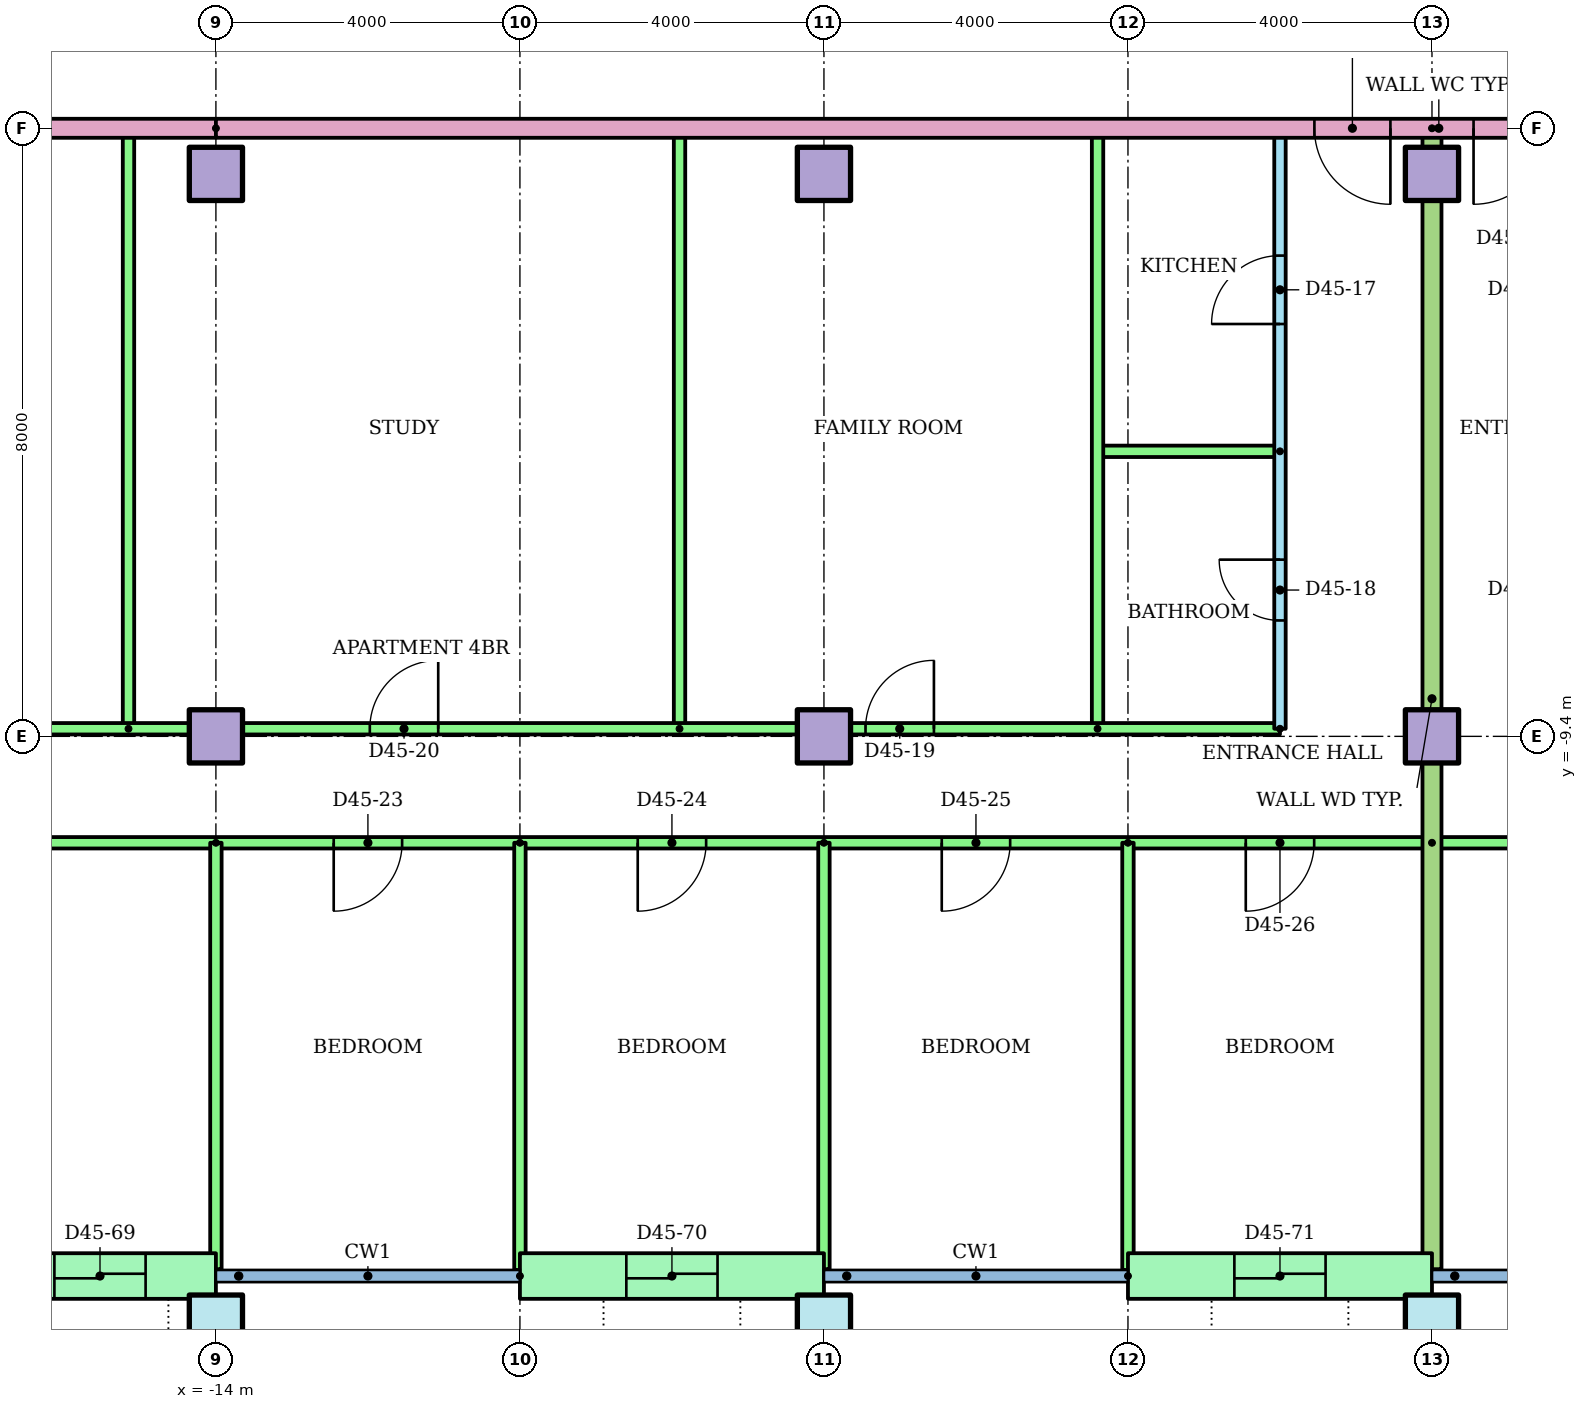
"""IFC4 building model, lengths in metres.
Left out: names, types, materials, properties, quantities, classifications, styles, units other than length and angle.
Written with IfcOpenShell. Run it as: python <this file> out.ifc"""

import sys

from ifc_helpers import new_model, si_unit, direction, frame, frame_2d, origin, origin_2d, place, context, subcontext, project, spatial, rectangle, hollow_rectangle, extrude, element, fill, save


model = new_model("IFC4")
c1 = context("Model", 3, precision=1e-05, world=origin(), true_north=direction((0.0, 1.0)))
c2 = subcontext(c1, "Body", "Model", "MODEL_VIEW")
j1 = project(units=[si_unit("LENGTHUNIT", "METRE"), si_unit("PLANEANGLEUNIT", "RADIAN")], contexts=[c1])
p1 = place(None, origin())
s1 = spatial("IfcSite", under=j1, at=p1, CompositionType="ELEMENT")
p2 = place(p1, origin())
s2 = spatial("IfcBuilding", under=s1, at=p2, CompositionType="ELEMENT")
p3 = place(p2, frame((0.0, 0.0, 174.9)))
s3 = spatial("IfcBuildingStorey", under=s2, at=p3, CompositionType="ELEMENT", Elevation=174.9)
for number, where in (
    (1, (-14.0, -17.1, 0.0)),
    (2, (-6.0, -17.1, 0.0)),
    (3, (2.0, -17.1, 0.0)),
):
    element("IfcColumn", number, at=place(p3, frame(where)), inside=s3, PredefinedType="COLUMN", context=c2, shape_type="SweptSolid", body=[
        extrude(hollow_rectangle(XDim=0.7, YDim=0.7, WallThickness=0.036, at=origin_2d()), origin(), (0.0, 0.0, 1.0), 3.2),
    ])
for number, where in (
    (4, (-14.0, -9.4, 0.0)),
    (5, (-6.0, -9.4, 0.0)),
    (6, (2.0, -9.4, 0.0)),
    (7, (-14.0, -2.0, 0.0)),
    (8, (-6.0, -2.0, 0.0)),
    (9, (2.0, -2.0, 0.0)),
):
    element("IfcColumn", number, at=place(p3, frame(where)), inside=s3, PredefinedType="COLUMN", context=c2, shape_type="SweptSolid", body=[
        extrude(rectangle(XDim=0.7, YDim=0.7, at=origin_2d()), origin(), (0.0, 0.0, 1.0), 3.2),
    ])
p4 = place(p3, frame((-17.05, -16.5, 0.0)))
e10 = element("IfcWall", 10, at=p4, inside=s3, PredefinedType="STANDARD", context=c2, shape_type="SweptSolid", body=[
    extrude(rectangle(XDim=3.05, YDim=0.6, at=frame_2d((1.525, 0.0))), origin(), (0.0, 0.0, 1.0), 2.92),
])
p5 = place(p4, frame((0.925, 0.0, 0.0)))
e11 = element("IfcOpeningElement", 11, at=p5, cuts=e10, PredefinedType="OPENING", context=c2, shape_type="SweptSolid", body=[
    extrude(rectangle(XDim=1.2, YDim=2.1, at=frame_2d((0.6, 1.05))), frame((0.0, 0.31, 0.0), z_axis=(0.0, -1.0, 0.0), x_axis=(1.0, 0.0, 0.0)), (0.0, 0.0, 1.0), 0.62),
])
p6 = place(p3, frame((-10.0, -16.5, 0.0)))
e12 = element("IfcWall", 12, at=p6, inside=s3, PredefinedType="STANDARD", context=c2, shape_type="SweptSolid", body=[
    extrude(rectangle(XDim=4.0, YDim=0.6, at=frame_2d((2.0, 0.0))), origin(), (0.0, 0.0, 1.0), 2.92),
])
p7 = place(p6, frame((1.4, 0.0, 0.0)))
e13 = element("IfcOpeningElement", 13, at=p7, cuts=e12, PredefinedType="OPENING", context=c2, shape_type="SweptSolid", body=[
    extrude(rectangle(XDim=1.2, YDim=2.1, at=frame_2d((0.6, 1.05))), frame((0.0, 0.31, 0.0), z_axis=(0.0, -1.0, 0.0), x_axis=(1.0, 0.0, 0.0)), (0.0, 0.0, 1.0), 0.62),
])
p8 = place(p3, frame((-2.0, -16.5, 0.0)))
e14 = element("IfcWall", 14, at=p8, inside=s3, PredefinedType="STANDARD", context=c2, shape_type="SweptSolid", body=[
    extrude(rectangle(XDim=4.0, YDim=0.6, at=frame_2d((2.0, 0.0))), origin(), (0.0, 0.0, 1.0), 2.92),
])
p9 = place(p8, frame((1.4, 0.0, 0.0)))
e15 = element("IfcOpeningElement", 15, at=p9, cuts=e14, PredefinedType="OPENING", context=c2, shape_type="SweptSolid", body=[
    extrude(rectangle(XDim=1.2, YDim=2.1, at=frame_2d((0.6, 1.05))), frame((0.0, 0.31, 0.0), z_axis=(0.0, -1.0, 0.0), x_axis=(1.0, 0.0, 0.0)), (0.0, 0.0, 1.0), 0.62),
])
p10 = place(p3, frame((0.0, -9.3, 0.0), z_axis=(0.0, 0.0, 1.0), x_axis=(0.0, 1.0, 0.0)))
e16 = element("IfcWall", 16, at=p10, inside=s3, PredefinedType="PARTITIONING", context=c2, shape_type="SweptSolid", body=[
    extrude(rectangle(XDim=7.9, YDim=0.15, at=frame_2d((3.95, 0.0))), origin(), (0.0, 0.0, 1.0), 2.4),
])
p11 = place(p10, frame((5.325, 0.0, 0.0)))
e17 = element("IfcOpeningElement", 17, at=p11, cuts=e16, PredefinedType="OPENING", context=c2, shape_type="SweptSolid", body=[
    extrude(rectangle(XDim=0.9, YDim=2.1, at=frame_2d((0.45, 1.05))), frame((0.0, 0.085, 0.0), z_axis=(0.0, -1.0, 0.0), x_axis=(1.0, 0.0, 0.0)), (0.0, 0.0, 1.0), 0.17),
])
p12 = place(p10, frame((1.425, 0.0, 0.0)))
e18 = element("IfcOpeningElement", 18, at=p12, cuts=e16, PredefinedType="OPENING", context=c2, shape_type="SweptSolid", body=[
    extrude(rectangle(XDim=0.8, YDim=2.1, at=frame_2d((0.4, 1.05))), frame((0.0, 0.085, 0.0), z_axis=(0.0, -1.0, 0.0), x_axis=(1.0, 0.0, 0.0)), (0.0, 0.0, 1.0), 0.17),
])
p13 = place(p3, frame((0.0, -5.65, 0.0), z_axis=(0.0, 0.0, 1.0), x_axis=(-1.0, 0.0, 0.0)))
e19 = element("IfcWall", 19, at=p13, inside=s3, PredefinedType="PARTITIONING", context=c2, shape_type="SweptSolid", body=[
    extrude(rectangle(XDim=2.4, YDim=0.15, at=frame_2d((1.2, 0.0))), origin(), (0.0, 0.0, 1.0), 2.4),
])
for number, where, z_axis, x_axis in (
    (20, (-2.4, -9.3, 0.0), (0.0, 0.0, 1.0), (0.0, 1.0, 0.0)),
    (21, (-7.9, -9.3, 0.0), (0.0, 0.0, 1.0), (0.0, 1.0, 0.0)),
    (22, (-15.15, -9.3, 0.0), (0.0, 0.0, 1.0), (0.0, 1.0, 0.0)),
):
    element("IfcWall", number, at=place(p3, frame(where, z_axis=z_axis, x_axis=x_axis)), inside=s3, PredefinedType="PARTITIONING", context=c2, shape_type="SweptSolid", body=[
        extrude(rectangle(XDim=7.9, YDim=0.15, at=frame_2d((3.95, 0.0))), origin(), (0.0, 0.0, 1.0), 2.4),
    ])
p14 = place(p3, frame((-24.81, -9.3, 0.0)))
e23 = element("IfcWall", 23, at=p14, inside=s3, PredefinedType="PARTITIONING", context=c2, shape_type="SweptSolid", body=[
    extrude(rectangle(XDim=24.81, YDim=0.15, at=frame_2d((12.405, 0.0))), origin(), (0.0, 0.0, 1.0), 2.4),
])
p15 = place(p14, frame((19.357, 0.0, 0.0)))
e24 = element("IfcOpeningElement", 24, at=p15, cuts=e23, PredefinedType="OPENING", context=c2, shape_type="SweptSolid", body=[
    extrude(rectangle(XDim=0.9, YDim=2.1, at=frame_2d((0.45, 1.05))), frame((0.0, 0.085, 0.0), z_axis=(0.0, -1.0, 0.0), x_axis=(1.0, 0.0, 0.0)), (0.0, 0.0, 1.0), 0.17),
])
p16 = place(p14, frame((12.835, 0.0, 0.0)))
e25 = element("IfcOpeningElement", 25, at=p16, cuts=e23, PredefinedType="OPENING", context=c2, shape_type="SweptSolid", body=[
    extrude(rectangle(XDim=0.9, YDim=2.1, at=frame_2d((0.45, 1.05))), frame((0.0, 0.085, 0.0), z_axis=(0.0, -1.0, 0.0), x_axis=(1.0, 0.0, 0.0)), (0.0, 0.0, 1.0), 0.17),
])
p17 = place(p14, frame((4.485, 0.0, 0.0)))
e26 = element("IfcOpeningElement", 26, at=p17, cuts=e23, PredefinedType="OPENING", context=c2, shape_type="SweptSolid", body=[
    extrude(rectangle(XDim=0.9, YDim=2.1, at=frame_2d((0.45, 1.05))), frame((0.0, 0.085, 0.0), z_axis=(0.0, -1.0, 0.0), x_axis=(1.0, 0.0, 0.0)), (0.0, 0.0, 1.0), 0.17),
])
p18 = place(p3, frame((2.0, -10.8, 0.0), z_axis=(0.0, 0.0, 1.0), x_axis=(-1.0, 0.0, 0.0)))
e27 = element("IfcWall", 27, at=p18, inside=s3, PredefinedType="PARTITIONING", context=c2, shape_type="SweptSolid", body=[
    extrude(rectangle(XDim=26.82, YDim=0.15, at=frame_2d((13.41, 0.0))), origin(), (0.0, 0.0, 1.0), 2.4),
])
p19 = place(p18, frame((20.8, 0.0, 0.0)))
e28 = element("IfcOpeningElement", 28, at=p19, cuts=e27, PredefinedType="OPENING", context=c2, shape_type="SweptSolid", body=[
    extrude(rectangle(XDim=1.0, YDim=2.1, at=frame_2d((0.5, 1.05))), frame((0.0, 0.085, 0.0), z_axis=(0.0, -1.0, 0.0), x_axis=(1.0, 0.0, 0.0)), (0.0, 0.0, 1.0), 0.17),
])
p20 = place(p18, frame((13.55, 0.0, 0.0)))
e29 = element("IfcOpeningElement", 29, at=p20, cuts=e27, PredefinedType="OPENING", context=c2, shape_type="SweptSolid", body=[
    extrude(rectangle(XDim=0.9, YDim=2.1, at=frame_2d((0.45, 1.05))), frame((0.0, 0.085, 0.0), z_axis=(0.0, -1.0, 0.0), x_axis=(1.0, 0.0, 0.0)), (0.0, 0.0, 1.0), 0.17),
])
p21 = place(p18, frame((9.55, 0.0, 0.0)))
e30 = element("IfcOpeningElement", 30, at=p21, cuts=e27, PredefinedType="OPENING", context=c2, shape_type="SweptSolid", body=[
    extrude(rectangle(XDim=0.9, YDim=2.1, at=frame_2d((0.45, 1.05))), frame((0.0, 0.085, 0.0), z_axis=(0.0, -1.0, 0.0), x_axis=(1.0, 0.0, 0.0)), (0.0, 0.0, 1.0), 0.17),
])
p22 = place(p18, frame((5.55, 0.0, 0.0)))
e31 = element("IfcOpeningElement", 31, at=p22, cuts=e27, PredefinedType="OPENING", context=c2, shape_type="SweptSolid", body=[
    extrude(rectangle(XDim=0.9, YDim=2.1, at=frame_2d((0.45, 1.05))), frame((0.0, 0.085, 0.0), z_axis=(0.0, -1.0, 0.0), x_axis=(1.0, 0.0, 0.0)), (0.0, 0.0, 1.0), 0.17),
])
p23 = place(p18, frame((1.55, 0.0, 0.0)))
e32 = element("IfcOpeningElement", 32, at=p23, cuts=e27, PredefinedType="OPENING", context=c2, shape_type="SweptSolid", body=[
    extrude(rectangle(XDim=0.9, YDim=2.1, at=frame_2d((0.45, 1.05))), frame((0.0, 0.085, 0.0), z_axis=(0.0, -1.0, 0.0), x_axis=(1.0, 0.0, 0.0)), (0.0, 0.0, 1.0), 0.17),
])
p24 = place(p3, frame((-14.0, -10.8, 0.0), z_axis=(0.0, 0.0, 1.0), x_axis=(0.0, -1.0, 0.0)))
e33 = element("IfcWall", 33, at=p24, inside=s3, PredefinedType="PARTITIONING", context=c2, shape_type="SweptSolid", body=[
    extrude(rectangle(XDim=5.61, YDim=0.15, at=frame_2d((2.805, 0.0))), origin(), (0.0, 0.0, 1.0), 2.4),
])
p25 = place(p3, frame((-10.0, -10.8, 0.0), z_axis=(0.0, 0.0, 1.0), x_axis=(0.0, -1.0, 0.0)))
e34 = element("IfcWall", 34, at=p25, inside=s3, PredefinedType="PARTITIONING", context=c2, shape_type="SweptSolid", body=[
    extrude(rectangle(XDim=5.621, YDim=0.15, at=frame_2d((2.811, 0.0))), origin(), (0.0, 0.0, 1.0), 2.4),
])
p26 = place(p3, frame((-6.0, -10.8, 0.0), z_axis=(0.0, 0.0, 1.0), x_axis=(0.0, -1.0, 0.0)))
e35 = element("IfcWall", 35, at=p26, inside=s3, PredefinedType="PARTITIONING", context=c2, shape_type="SweptSolid", body=[
    extrude(rectangle(XDim=5.61, YDim=0.15, at=frame_2d((2.805, 0.0))), origin(), (0.0, 0.0, 1.0), 2.4),
])
p27 = place(p3, frame((-2.0, -10.8, 0.0), z_axis=(0.0, 0.0, 1.0), x_axis=(0.0, -1.0, 0.0)))
e36 = element("IfcWall", 36, at=p27, inside=s3, PredefinedType="PARTITIONING", context=c2, shape_type="SweptSolid", body=[
    extrude(rectangle(XDim=5.621, YDim=0.15, at=frame_2d((2.811, 0.0))), origin(), (0.0, 0.0, 1.0), 2.4),
])
p28 = place(p3, frame((18.0, -10.8, 0.0), z_axis=(0.0, 0.0, 1.0), x_axis=(-1.0, 0.0, 0.0)))
e37 = element("IfcWall", 37, at=p28, inside=s3, PredefinedType="PARTITIONING", context=c2, shape_type="SweptSolid", body=[
    extrude(rectangle(XDim=16.0, YDim=0.15, at=frame_2d((8.0, 0.0))), origin(), (0.0, 0.0, 1.0), 2.4),
])
p29 = place(p28, frame((11.5, 0.0, 0.0)))
e38 = element("IfcOpeningElement", 38, at=p29, cuts=e37, PredefinedType="OPENING", context=c2, shape_type="SweptSolid", body=[
    extrude(rectangle(XDim=1.0, YDim=2.1, at=frame_2d((0.5, 1.05))), frame((0.0, 0.085, 0.0), z_axis=(0.0, -1.0, 0.0), x_axis=(1.0, 0.0, 0.0)), (0.0, 0.0, 1.0), 0.17),
])
p30 = place(p28, frame((5.55, 0.0, 0.0)))
e39 = element("IfcOpeningElement", 39, at=p30, cuts=e37, PredefinedType="OPENING", context=c2, shape_type="SweptSolid", body=[
    extrude(rectangle(XDim=0.9, YDim=2.1, at=frame_2d((0.45, 1.05))), frame((0.0, 0.085, 0.0), z_axis=(0.0, -1.0, 0.0), x_axis=(1.0, 0.0, 0.0)), (0.0, 0.0, 1.0), 0.17),
])
p31 = place(p28, frame((1.55, 0.0, 0.0)))
e40 = element("IfcOpeningElement", 40, at=p31, cuts=e37, PredefinedType="OPENING", context=c2, shape_type="SweptSolid", body=[
    extrude(rectangle(XDim=0.9, YDim=2.1, at=frame_2d((0.45, 1.05))), frame((0.0, 0.085, 0.0), z_axis=(0.0, -1.0, 0.0), x_axis=(1.0, 0.0, 0.0)), (0.0, 0.0, 1.0), 0.17),
])
p32 = place(p3, frame((2.0, -1.4, 0.0), z_axis=(0.0, 0.0, 1.0), x_axis=(0.0, -1.0, 0.0)))
e41 = element("IfcWall", 41, at=p32, inside=s3, PredefinedType="PARTITIONING", context=c2, shape_type="SweptSolid", body=[
    extrude(rectangle(XDim=15.01, YDim=0.25, at=frame_2d((7.505, 0.0))), origin(), (0.0, 0.0, 1.0), 2.4),
])
p33 = place(p3, frame((-14.0, -1.4, 0.0), z_axis=(0.0, 0.0, 1.0), x_axis=(-1.0, 0.0, 0.0)))
e42 = element("IfcWall", 42, at=p33, inside=s3, PredefinedType="PARTITIONING", context=c2, shape_type="SweptSolid", body=[
    extrude(rectangle(XDim=10.82, YDim=0.25, at=frame_2d((5.41, 0.0))), origin(), (0.0, 0.0, 1.0), 2.4),
])
p34 = place(p3, frame((14.0, -1.4, 0.0), z_axis=(0.0, 0.0, 1.0), x_axis=(-1.0, 0.0, 0.0)))
e43 = element("IfcWall", 43, at=p34, inside=s3, PredefinedType="PARTITIONING", context=c2, shape_type="SweptSolid", body=[
    extrude(rectangle(XDim=28.0, YDim=0.25, at=frame_2d((14.0, 0.0))), origin(), (0.0, 0.0, 1.0), 2.4),
])
p35 = place(p34, frame((12.547, 0.0, 0.0)))
e44 = element("IfcOpeningElement", 44, at=p35, cuts=e43, PredefinedType="OPENING", context=c2, shape_type="SweptSolid", body=[
    extrude(rectangle(XDim=1.0, YDim=2.1, at=frame_2d((0.5, 1.05))), frame((0.0, 0.135, 0.0), z_axis=(0.0, -1.0, 0.0), x_axis=(1.0, 0.0, 0.0)), (0.0, 0.0, 1.0), 0.27),
])
p36 = place(p34, frame((10.453, 0.0, 0.0)))
e45 = element("IfcOpeningElement", 45, at=p36, cuts=e43, PredefinedType="OPENING", context=c2, shape_type="SweptSolid", body=[
    extrude(rectangle(XDim=1.0, YDim=2.1, at=frame_2d((0.5, 1.05))), frame((0.0, 0.135, 0.0), z_axis=(0.0, -1.0, 0.0), x_axis=(1.0, 0.0, 0.0)), (0.0, 0.0, 1.0), 0.27),
])
p37 = place(p11, origin())
e46 = element("IfcDoor", 46, at=p37, inside=s3, OperationType="SINGLE_SWING_LEFT", PredefinedType="DOOR", context=c2, shape_type="SweptSolid", body=[
    extrude(rectangle(XDim=0.9, YDim=2.1, at=frame_2d((0.45, 1.05))), frame((0.0, 0.025, 0.0), z_axis=(0.0, -1.0, 0.0), x_axis=(1.0, 0.0, 0.0)), (0.0, 0.0, 1.0), 0.05),
])
fill(e17, e46)
p38 = place(p12, origin())
e47 = element("IfcDoor", 47, at=p38, inside=s3, OperationType="SINGLE_SWING_RIGHT", PredefinedType="DOOR", context=c2, shape_type="SweptSolid", body=[
    extrude(rectangle(XDim=0.8, YDim=2.1, at=frame_2d((0.4, 1.05))), frame((0.0, 0.025, 0.0), z_axis=(0.0, -1.0, 0.0), x_axis=(1.0, 0.0, 0.0)), (0.0, 0.0, 1.0), 0.05),
])
fill(e18, e47)
p39 = place(p15, origin())
e48 = element("IfcDoor", 48, at=p39, inside=s3, OperationType="SINGLE_SWING_RIGHT", PredefinedType="DOOR", context=c2, shape_type="SweptSolid", body=[
    extrude(rectangle(XDim=0.9, YDim=2.1, at=frame_2d((0.45, 1.05))), frame((0.0, 0.025, 0.0), z_axis=(0.0, -1.0, 0.0), x_axis=(1.0, 0.0, 0.0)), (0.0, 0.0, 1.0), 0.05),
])
fill(e24, e48)
p40 = place(p16, origin())
e49 = element("IfcDoor", 49, at=p40, inside=s3, OperationType="SINGLE_SWING_RIGHT", PredefinedType="DOOR", context=c2, shape_type="SweptSolid", body=[
    extrude(rectangle(XDim=0.9, YDim=2.1, at=frame_2d((0.45, 1.05))), frame((0.0, 0.025, 0.0), z_axis=(0.0, -1.0, 0.0), x_axis=(1.0, 0.0, 0.0)), (0.0, 0.0, 1.0), 0.05),
])
fill(e25, e49)
p41 = place(p20, origin())
e50 = element("IfcDoor", 50, at=p41, inside=s3, OperationType="SINGLE_SWING_RIGHT", PredefinedType="DOOR", context=c2, shape_type="SweptSolid", body=[
    extrude(rectangle(XDim=0.9, YDim=2.1, at=frame_2d((0.45, 1.05))), frame((0.0, 0.025, 0.0), z_axis=(0.0, -1.0, 0.0), x_axis=(1.0, 0.0, 0.0)), (0.0, 0.0, 1.0), 0.05),
])
fill(e29, e50)
p42 = place(p21, origin())
e51 = element("IfcDoor", 51, at=p42, inside=s3, OperationType="SINGLE_SWING_RIGHT", PredefinedType="DOOR", context=c2, shape_type="SweptSolid", body=[
    extrude(rectangle(XDim=0.9, YDim=2.1, at=frame_2d((0.45, 1.05))), frame((0.0, 0.025, 0.0), z_axis=(0.0, -1.0, 0.0), x_axis=(1.0, 0.0, 0.0)), (0.0, 0.0, 1.0), 0.05),
])
fill(e30, e51)
p43 = place(p22, origin())
e52 = element("IfcDoor", 52, at=p43, inside=s3, OperationType="SINGLE_SWING_RIGHT", PredefinedType="DOOR", context=c2, shape_type="SweptSolid", body=[
    extrude(rectangle(XDim=0.9, YDim=2.1, at=frame_2d((0.45, 1.05))), frame((0.0, 0.025, 0.0), z_axis=(0.0, -1.0, 0.0), x_axis=(1.0, 0.0, 0.0)), (0.0, 0.0, 1.0), 0.05),
])
fill(e31, e52)
p44 = place(p23, origin())
e53 = element("IfcDoor", 53, at=p44, inside=s3, OperationType="SINGLE_SWING_RIGHT", PredefinedType="DOOR", context=c2, shape_type="SweptSolid", body=[
    extrude(rectangle(XDim=0.9, YDim=2.1, at=frame_2d((0.45, 1.05))), frame((0.0, 0.025, 0.0), z_axis=(0.0, -1.0, 0.0), x_axis=(1.0, 0.0, 0.0)), (0.0, 0.0, 1.0), 0.05),
])
fill(e32, e53)
p45 = place(p35, origin())
e54 = element("IfcDoor", 54, at=p45, inside=s3, OperationType="SINGLE_SWING_LEFT", PredefinedType="DOOR", context=c2, shape_type="SweptSolid", body=[
    extrude(rectangle(XDim=1.0, YDim=2.1, at=frame_2d((0.5, 1.05))), frame((0.0, 0.025, 0.0), z_axis=(0.0, -1.0, 0.0), x_axis=(1.0, 0.0, 0.0)), (0.0, 0.0, 1.0), 0.05),
])
fill(e44, e54)
p46 = place(p36, origin())
e55 = element("IfcDoor", 55, at=p46, inside=s3, OperationType="SINGLE_SWING_RIGHT", PredefinedType="DOOR", context=c2, shape_type="SweptSolid", body=[
    extrude(rectangle(XDim=1.0, YDim=2.1, at=frame_2d((0.5, 1.05))), frame((0.0, 0.025, 0.0), z_axis=(0.0, -1.0, 0.0), x_axis=(1.0, 0.0, 0.0)), (0.0, 0.0, 1.0), 0.05),
])
fill(e45, e55)
p47 = place(p5, origin())
e56 = element("IfcDoor", 56, at=p47, inside=s3, OperationType="SLIDING_TO_LEFT", PredefinedType="DOOR", context=c2, shape_type="SweptSolid", body=[
    extrude(rectangle(XDim=1.2, YDim=2.1, at=frame_2d((0.6, 1.05))), frame((0.0, 0.025, 0.0), z_axis=(0.0, -1.0, 0.0), x_axis=(1.0, 0.0, 0.0)), (0.0, 0.0, 1.0), 0.05),
])
fill(e11, e56)
p48 = place(p7, origin())
e57 = element("IfcDoor", 57, at=p48, inside=s3, OperationType="SLIDING_TO_LEFT", PredefinedType="DOOR", context=c2, shape_type="SweptSolid", body=[
    extrude(rectangle(XDim=1.2, YDim=2.1, at=frame_2d((0.6, 1.05))), frame((0.0, 0.025, 0.0), z_axis=(0.0, -1.0, 0.0), x_axis=(1.0, 0.0, 0.0)), (0.0, 0.0, 1.0), 0.05),
])
fill(e13, e57)
p49 = place(p9, origin())
e58 = element("IfcDoor", 58, at=p49, inside=s3, OperationType="SLIDING_TO_LEFT", PredefinedType="DOOR", context=c2, shape_type="SweptSolid", body=[
    extrude(rectangle(XDim=1.2, YDim=2.1, at=frame_2d((0.6, 1.05))), frame((0.0, 0.025, 0.0), z_axis=(0.0, -1.0, 0.0), x_axis=(1.0, 0.0, 0.0)), (0.0, 0.0, 1.0), 0.05),
])
fill(e15, e58)
save(model, sys.argv[1])
